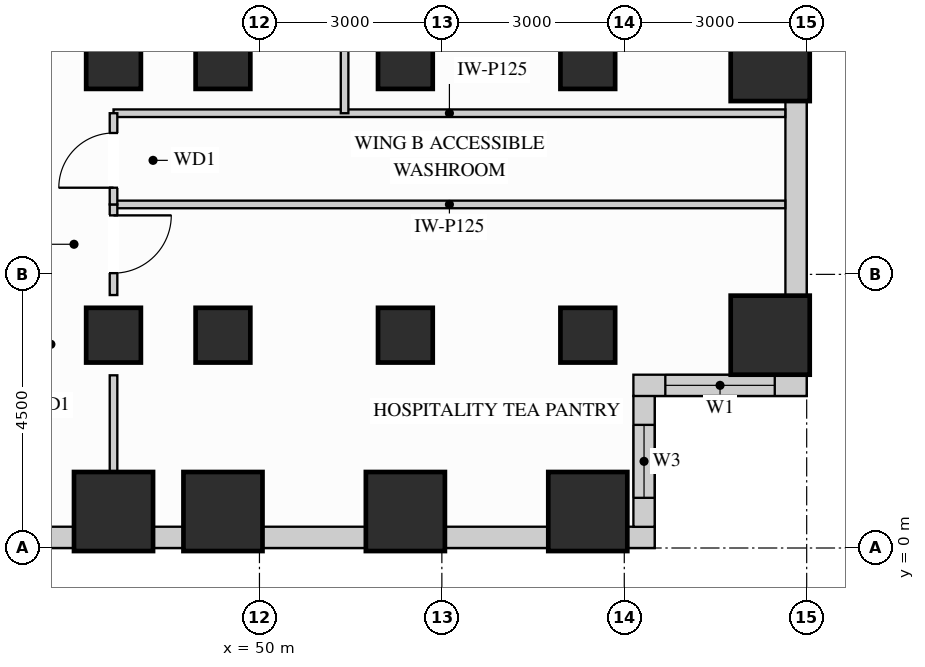
"""IFC4 building model, lengths in metres.
Left out: names, types, materials, properties, quantities, classifications, styles, units other than length and angle.
Written with IfcOpenShell. Run it as: python <this file> out.ifc"""

import sys

from ifc_helpers import new_model, si_unit, direction, frame, frame_2d, origin, origin_2d, place, context, subcontext, project, spatial, rectangle, extrude, source, transform, mapped, element, fill, save


model = new_model("IFC4")
c1 = context("Model", 3, precision=1e-05, world=origin(), true_north=direction((0.0, 1.0)))
c2 = subcontext(c1, "Body", "Model", "MODEL_VIEW")
j1 = project(units=[si_unit("LENGTHUNIT", "METRE"), si_unit("PLANEANGLEUNIT", "RADIAN")], contexts=[c1])
p1 = place(None, origin())
s1 = spatial("IfcSite", under=j1, at=p1, CompositionType="ELEMENT")
p2 = place(p1, origin())
s2 = spatial("IfcBuilding", under=s1, at=p2, CompositionType="ELEMENT")
p3 = place(p2, frame((0.0, 0.0, 40.5)))
s3 = spatial("IfcBuildingStorey", under=s2, at=p3, CompositionType="ELEMENT", Elevation=40.5)
m1 = source(origin(), c2, "Body", "SweptSolid", [
    extrude(rectangle(XDim=0.9, YDim=0.9, at=origin_2d()), origin(), (0.0, 0.0, 1.0), 3.38),
])
for number, where, z_axis, x_axis in (
    (1, (47.6, 3.5, 0.0), (0.0, 0.0, 1.0), (1.0, 0.0, 0.0)),
    (2, (47.6, 8.0, 0.0), (0.0, 0.0, 1.0), (1.0, 0.0, 0.0)),
    (3, (49.4, 3.5, 0.0), (0.0, 0.0, 1.0), (1.0, 0.0, 0.0)),
    (4, (49.4, 8.0, 0.0), (0.0, 0.0, 1.0), (1.0, 0.0, 0.0)),
    (5, (52.4, 3.5, 0.0), (0.0, 0.0, 1.0), (1.0, 0.0, 0.0)),
    (6, (52.4, 8.0, 0.0), (0.0, 0.0, 1.0), (1.0, 0.0, 0.0)),
    (7, (55.4, 3.5, 0.0), (0.0, 0.0, 1.0), (1.0, 0.0, 0.0)),
    (8, (55.4, 8.0, 0.0), (0.0, 0.0, 1.0), (1.0, 0.0, 0.0)),
):
    element("IfcColumn", number, at=place(p3, frame(where, z_axis=z_axis, x_axis=x_axis)), inside=s3, PredefinedType="COLUMN", context=c2, shape_type="MappedRepresentation", body=[
        mapped(m1, transform((0.0, 0.0, 0.0), x_axis=(1.0, 0.0, 0.0), y_axis=(0.0, 1.0, 0.0), z_axis=(0.0, 0.0, 1.0))),
    ])
m2 = source(origin(), c2, "Body", "SweptSolid", [
    extrude(rectangle(XDim=1.3, YDim=1.3, at=origin_2d()), origin(), (0.0, 0.0, 1.0), 3.38),
])
for number, where, z_axis, x_axis in (
    (9, (58.4, 3.5, 0.0), (0.0, 0.0, 1.0), (1.0, 0.0, 0.0)),
    (10, (58.4, 8.0, 0.0), (0.0, 0.0, 1.0), (1.0, 0.0, 0.0)),
    (11, (47.6, 0.6, 0.0), (0.0, 0.0, 1.0), (1.0, 0.0, 0.0)),
    (12, (49.4, 0.6, 0.0), (0.0, 0.0, 1.0), (1.0, 0.0, 0.0)),
    (13, (52.4, 0.6, 0.0), (0.0, 0.0, 1.0), (1.0, 0.0, 0.0)),
    (14, (55.4, 0.6, 0.0), (0.0, 0.0, 1.0), (1.0, 0.0, 0.0)),
):
    element("IfcColumn", number, at=place(p3, frame(where, z_axis=z_axis, x_axis=x_axis)), inside=s3, PredefinedType="COLUMN", context=c2, shape_type="MappedRepresentation", body=[
        mapped(m2, transform((0.0, 0.0, 0.0), x_axis=(1.0, 0.0, 0.0), y_axis=(0.0, 1.0, 0.0), z_axis=(0.0, 0.0, 1.0))),
    ])
p4 = place(p3, frame((40.648, 0.175, 0.0), z_axis=(0.0, 0.0, 1.0), x_axis=(1.0, 0.0, 0.0)))
e15 = element("IfcWall", 15, at=p4, inside=s3, PredefinedType="SOLIDWALL", context=c2, shape_type="SweptSolid", body=[
    extrude(rectangle(XDim=6.304, YDim=0.35, at=frame_2d((3.152, 0.0))), origin(), (0.0, 0.0, 1.0), 2.51),
])
p5 = place(p4, frame((0.687, 0.0, 0.78)))
e16 = element("IfcOpeningElement", 16, at=p5, cuts=e15, PredefinedType="OPENING", context=c2, shape_type="SweptSolid", body=[
    extrude(rectangle(XDim=1.8, YDim=1.55, at=frame_2d((0.9, 0.775))), frame((0.0, 0.185, 0.0), z_axis=(0.0, -1.0, 0.0), x_axis=(1.0, 0.0, 0.0)), (0.0, 0.0, 1.0), 0.37),
])
p6 = place(p4, frame((2.855, 0.0, 0.78)))
e17 = element("IfcOpeningElement", 17, at=p6, cuts=e15, PredefinedType="OPENING", context=c2, shape_type="SweptSolid", body=[
    extrude(rectangle(XDim=1.8, YDim=1.55, at=frame_2d((0.9, 0.775))), frame((0.0, 0.185, 0.0), z_axis=(0.0, -1.0, 0.0), x_axis=(1.0, 0.0, 0.0)), (0.0, 0.0, 1.0), 0.37),
])
m3 = source(origin(), c2, "Body", "SweptSolid", [
    extrude(rectangle(XDim=0.504, YDim=0.35, at=frame_2d((0.252, 0.0))), origin(), (0.0, 0.0, 1.0), 3.365),
])
p7 = place(p3, frame((48.248, 0.175, 0.0), z_axis=(0.0, 0.0, 1.0), x_axis=(1.0, 0.0, 0.0)))
e18 = element("IfcWall", 18, at=p7, inside=s3, PredefinedType="SOLIDWALL", context=c2, shape_type="MappedRepresentation", body=[
    mapped(m3, transform((0.0, 0.0, 0.0), x_axis=(1.0, 0.0, 0.0), y_axis=(0.0, 1.0, 0.0), z_axis=(0.0, 0.0, 1.0))),
])
m4 = source(origin(), c2, "Body", "SweptSolid", [
    extrude(rectangle(XDim=1.704, YDim=0.35, at=frame_2d((0.852, 0.0))), origin(), (0.0, 0.0, 1.0), 2.51),
])
for number, where, z_axis, x_axis in (
    (19, (50.048, 0.175, 0.0), (0.0, 0.0, 1.0), (1.0, 0.0, 0.0)),
    (20, (53.048, 0.175, 0.0), (0.0, 0.0, 1.0), (1.0, 0.0, 0.0)),
):
    element("IfcWall", number, at=place(p3, frame(where, z_axis=z_axis, x_axis=x_axis)), inside=s3, PredefinedType="SOLIDWALL", context=c2, shape_type="MappedRepresentation", body=[
        mapped(m4, transform((0.0, 0.0, 0.0), x_axis=(1.0, 0.0, 0.0), y_axis=(0.0, 1.0, 0.0), z_axis=(0.0, 0.0, 1.0))),
    ])
m5 = source(origin(), c2, "Body", "SweptSolid", [
    extrude(rectangle(XDim=0.452, YDim=0.35, at=frame_2d((0.226, 0.0))), origin(), (0.0, 0.0, 1.0), 3.365),
])
p8 = place(p3, frame((56.048, 0.175, 0.0), z_axis=(0.0, 0.0, 1.0), x_axis=(1.0, 0.0, 0.0)))
e21 = element("IfcWall", 21, at=p8, inside=s3, PredefinedType="SOLIDWALL", context=c2, shape_type="MappedRepresentation", body=[
    mapped(m5, transform((0.0, 0.0, 0.0), x_axis=(1.0, 0.0, 0.0), y_axis=(0.0, 1.0, 0.0), z_axis=(0.0, 0.0, 1.0))),
])
p9 = place(p3, frame((56.325, 0.348, 0.0), z_axis=(0.0, 0.0, 1.0), x_axis=(0.0, 1.0, 0.0)))
e22 = element("IfcWall", 22, at=p9, inside=s3, PredefinedType="SOLIDWALL", context=c2, shape_type="SweptSolid", body=[
    extrude(rectangle(XDim=2.154, YDim=0.35, at=frame_2d((1.077, 0.0))), origin(), (0.0, 0.0, 1.0), 3.365),
])
p10 = place(p9, frame((0.477, 0.0, 0.78)))
e23 = element("IfcOpeningElement", 23, at=p10, cuts=e22, PredefinedType="OPENING", context=c2, shape_type="SweptSolid", body=[
    extrude(rectangle(XDim=1.2, YDim=2.1, at=frame_2d((0.6, 1.05))), frame((0.0, 0.185, 0.0), z_axis=(0.0, -1.0, 0.0), x_axis=(1.0, 0.0, 0.0)), (0.0, 0.0, 1.0), 0.37),
])
p11 = place(p3, frame((56.15, 2.675, 0.0), z_axis=(0.0, 0.0, 1.0), x_axis=(1.0, 0.0, 0.0)))
e24 = element("IfcWall", 24, at=p11, inside=s3, PredefinedType="SOLIDWALL", context=c2, shape_type="SweptSolid", body=[
    extrude(rectangle(XDim=2.85, YDim=0.35, at=frame_2d((1.425, 0.0))), origin(), (0.0, 0.0, 1.0), 3.365),
])
p12 = place(p11, frame((0.525, 0.0, 0.78)))
e25 = element("IfcOpeningElement", 25, at=p12, cuts=e24, PredefinedType="OPENING", context=c2, shape_type="SweptSolid", body=[
    extrude(rectangle(XDim=1.8, YDim=2.1, at=frame_2d((0.9, 1.05))), frame((0.0, 0.185, 0.0), z_axis=(0.0, -1.0, 0.0), x_axis=(1.0, 0.0, 0.0)), (0.0, 0.0, 1.0), 0.37),
])
m6 = source(origin(), c2, "Body", "SweptSolid", [
    extrude(rectangle(XDim=3.204, YDim=0.35, at=frame_2d((1.602, 0.0))), origin(), (0.0, 0.0, 1.0), 2.51),
])
p13 = place(p3, frame((58.825, 4.148, 0.0), z_axis=(0.0, 0.0, 1.0), x_axis=(0.0, 1.0, 0.0)))
e26 = element("IfcWall", 26, at=p13, inside=s3, PredefinedType="SOLIDWALL", context=c2, shape_type="MappedRepresentation", body=[
    mapped(m6, transform((0.0, 0.0, 0.0), x_axis=(1.0, 0.0, 0.0), y_axis=(0.0, 1.0, 0.0), z_axis=(0.0, 0.0, 1.0))),
])
m7 = source(origin(), c2, "Body", "SweptSolid", [
    extrude(rectangle(XDim=11.048, YDim=0.125, at=frame_2d((5.524, 0.0))), origin(), (0.0, 0.0, 1.0), 3.365),
])
for number, where, z_axis, x_axis in (
    (27, (47.6, 5.65, 0.0), (0.0, 0.0, 1.0), (1.0, 0.0, 0.0)),
    (28, (47.6, 7.15, 0.0), (0.0, 0.0, 1.0), (1.0, 0.0, 0.0)),
):
    element("IfcWall", number, at=place(p3, frame(where, z_axis=z_axis, x_axis=x_axis)), inside=s3, PredefinedType="PARTITIONING", context=c2, shape_type="MappedRepresentation", body=[
        mapped(m7, transform((0.0, 0.0, 0.0), x_axis=(1.0, 0.0, 0.0), y_axis=(0.0, 1.0, 0.0), z_axis=(0.0, 0.0, 1.0))),
    ])
m8 = source(origin(), c2, "Body", "SweptSolid", [
    extrude(rectangle(XDim=3.45, YDim=0.125, at=frame_2d((1.725, 0.0))), origin(), (0.0, 0.0, 1.0), 3.365),
])
p14 = place(p3, frame((51.4, 7.15, 0.0), z_axis=(0.0, 0.0, 1.0), x_axis=(0.0, 1.0, 0.0)))
e29 = element("IfcWall", 29, at=p14, inside=s3, PredefinedType="PARTITIONING", context=c2, shape_type="MappedRepresentation", body=[
    mapped(m8, transform((0.0, 0.0, 0.0), x_axis=(1.0, 0.0, 0.0), y_axis=(0.0, 1.0, 0.0), z_axis=(0.0, 0.0, 1.0))),
])
p15 = place(p3, frame((47.6, 4.16, 0.0), z_axis=(0.0, 0.0, 1.0), x_axis=(0.0, 1.0, 0.0)))
e30 = element("IfcWall", 30, at=p15, inside=s3, PredefinedType="PARTITIONING", context=c2, shape_type="SweptSolid", body=[
    extrude(rectangle(XDim=1.49, YDim=0.125, at=frame_2d((0.745, 0.0))), origin(), (0.0, 0.0, 1.0), 2.67),
])
p16 = place(p15, frame((0.36, 0.0, 0.0)))
e31 = element("IfcOpeningElement", 31, at=p16, cuts=e30, PredefinedType="OPENING", context=c2, shape_type="SweptSolid", body=[
    extrude(rectangle(XDim=0.95, YDim=2.15, at=frame_2d((0.475, 1.075))), frame((0.0, 0.073, 0.0), z_axis=(0.0, -1.0, 0.0), x_axis=(1.0, 0.0, 0.0)), (0.0, 0.0, 1.0), 0.145),
])
m9 = source(origin(), c2, "Body", "SweptSolid", [
    extrude(rectangle(XDim=1.58, YDim=0.125, at=frame_2d((0.79, 0.0))), origin(), (0.0, 0.0, 1.0), 2.67),
])
p17 = place(p3, frame((47.6, 1.26, 0.0), z_axis=(0.0, 0.0, 1.0), x_axis=(0.0, 1.0, 0.0)))
e32 = element("IfcWall", 32, at=p17, inside=s3, PredefinedType="PARTITIONING", context=c2, shape_type="MappedRepresentation", body=[
    mapped(m9, transform((0.0, 0.0, 0.0), x_axis=(1.0, 0.0, 0.0), y_axis=(0.0, 1.0, 0.0), z_axis=(0.0, 0.0, 1.0))),
])
p18 = place(p3, frame((47.6, 5.65, 0.0), z_axis=(0.0, 0.0, 1.0), x_axis=(0.0, 1.0, 0.0)))
e33 = element("IfcWall", 33, at=p18, inside=s3, PredefinedType="PARTITIONING", context=c2, shape_type="SweptSolid", body=[
    extrude(rectangle(XDim=1.5, YDim=0.125, at=frame_2d((0.75, 0.0))), origin(), (0.0, 0.0, 1.0), 2.67),
])
p19 = place(p18, frame((0.275, 0.0, 0.0)))
e34 = element("IfcOpeningElement", 34, at=p19, cuts=e33, PredefinedType="OPENING", context=c2, shape_type="SweptSolid", body=[
    extrude(rectangle(XDim=0.9, YDim=2.15, at=frame_2d((0.45, 1.075))), frame((0.0, 0.073, 0.0), z_axis=(0.0, -1.0, 0.0), x_axis=(1.0, 0.0, 0.0)), (0.0, 0.0, 1.0), 0.145),
])
m10 = source(origin(), c2, "Body", "SweptSolid", [
    extrude(rectangle(XDim=0.95, YDim=2.15, at=frame_2d((0.475, 1.075))), frame((0.0, 0.025, 0.0), z_axis=(0.0, -1.0, 0.0), x_axis=(1.0, 0.0, 0.0)), (0.0, 0.0, 1.0), 0.05),
])
p20 = place(p16, origin())
e35 = element("IfcDoor", 35, at=p20, inside=s3, OperationType="SINGLE_SWING_RIGHT", PredefinedType="DOOR", context=c2, shape_type="MappedRepresentation", body=[
    mapped(m10, transform((0.0, 0.0, 0.0), x_axis=(1.0, 0.0, 0.0), y_axis=(0.0, 1.0, 0.0), z_axis=(0.0, 0.0, 1.0))),
])
fill(e31, e35)
m11 = source(origin(), c2, "Body", "SweptSolid", [
    extrude(rectangle(XDim=0.9, YDim=2.15, at=frame_2d((0.45, 1.075))), frame((0.0, 0.025, 0.0), z_axis=(0.0, -1.0, 0.0), x_axis=(1.0, 0.0, 0.0)), (0.0, 0.0, 1.0), 0.05),
])
p21 = place(p19, origin())
e36 = element("IfcDoor", 36, at=p21, inside=s3, OperationType="SINGLE_SWING_LEFT", PredefinedType="DOOR", context=c2, shape_type="MappedRepresentation", body=[
    mapped(m11, transform((0.0, 0.0, 0.0), x_axis=(1.0, 0.0, 0.0), y_axis=(0.0, 1.0, 0.0), z_axis=(0.0, 0.0, 1.0))),
])
fill(e34, e36)
m12 = source(origin(), c2, "Body", "SweptSolid", [
    extrude(rectangle(XDim=1.8, YDim=2.1, at=frame_2d((0.9, 1.05))), frame((0.0, 0.03, 0.0), z_axis=(0.0, -1.0, 0.0), x_axis=(1.0, 0.0, 0.0)), (0.0, 0.0, 1.0), 0.06),
])
p22 = place(p12, origin())
e37 = element("IfcWindow", 37, at=p22, inside=s3, PartitioningType="SINGLE_PANEL", PredefinedType="WINDOW", context=c2, shape_type="MappedRepresentation", body=[
    mapped(m12, transform((0.0, 0.0, 0.0), x_axis=(1.0, 0.0, 0.0), y_axis=(0.0, 1.0, 0.0), z_axis=(0.0, 0.0, 1.0))),
])
fill(e25, e37)
m13 = source(origin(), c2, "Body", "SweptSolid", [
    extrude(rectangle(XDim=1.2, YDim=2.1, at=frame_2d((0.6, 1.05))), frame((0.0, 0.03, 0.0), z_axis=(0.0, -1.0, 0.0), x_axis=(1.0, 0.0, 0.0)), (0.0, 0.0, 1.0), 0.06),
])
p23 = place(p10, origin())
e38 = element("IfcWindow", 38, at=p23, inside=s3, PartitioningType="SINGLE_PANEL", PredefinedType="WINDOW", context=c2, shape_type="MappedRepresentation", body=[
    mapped(m13, transform((0.0, 0.0, 0.0), x_axis=(1.0, 0.0, 0.0), y_axis=(0.0, 1.0, 0.0), z_axis=(0.0, 0.0, 1.0))),
])
fill(e23, e38)
save(model, sys.argv[1])
